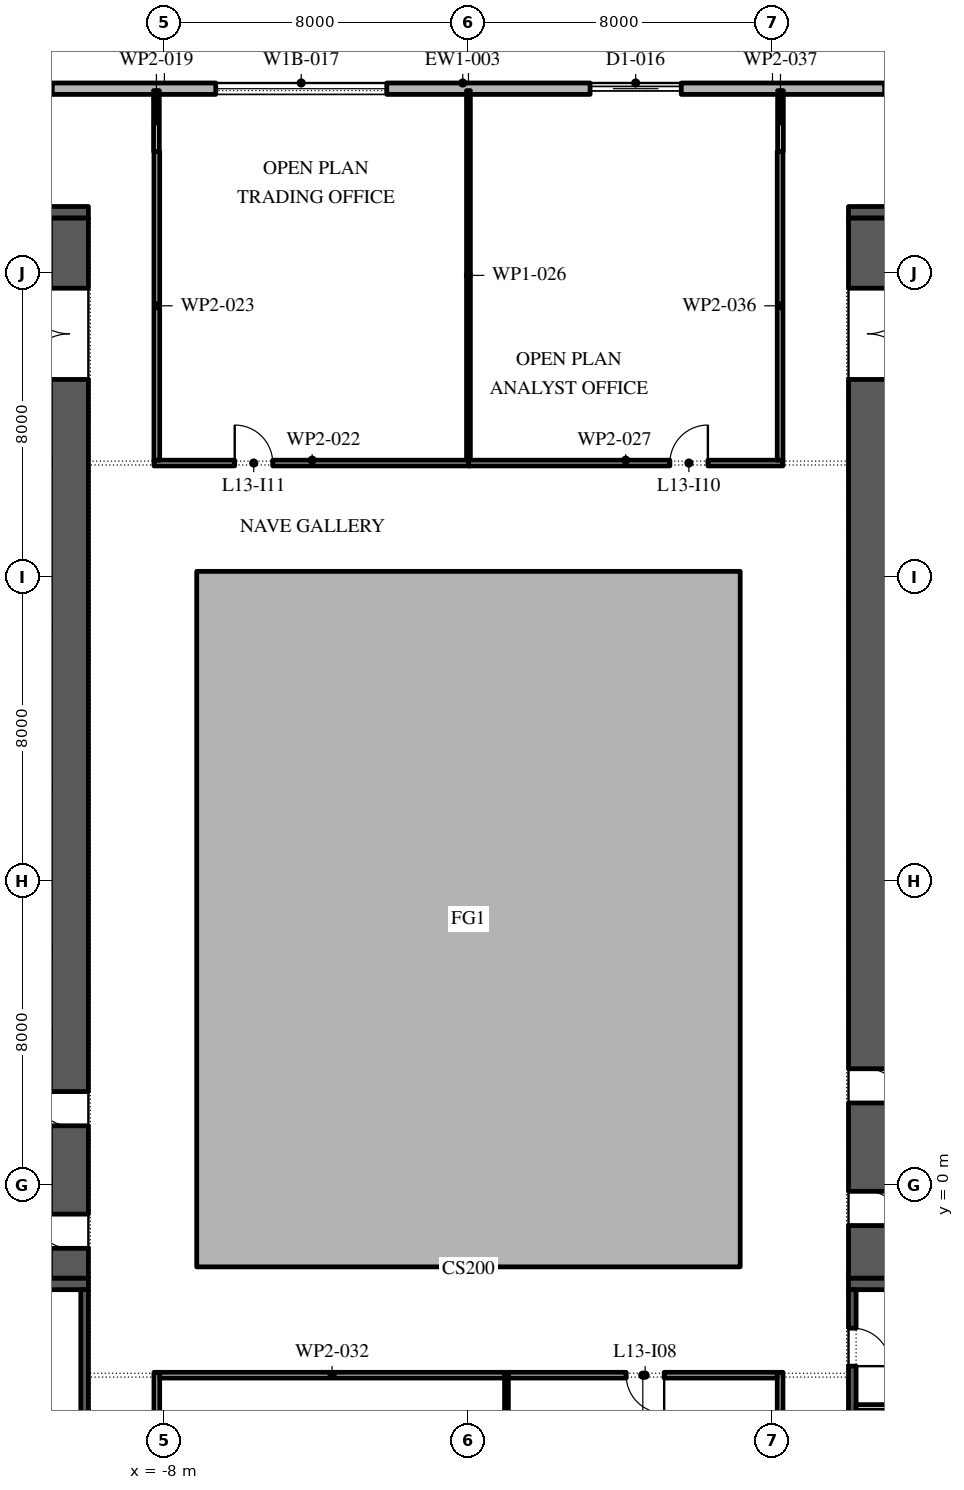
"""IFC4 building model, lengths in metres.
Left out: names, types, materials, properties, quantities, classifications, styles, units other than length and angle.
Written with IfcOpenShell. Run it as: python <this file> out.ifc"""

import sys

from ifc_helpers import new_model, si_unit, direction, frame, frame_2d, origin, place, context, subcontext, project, spatial, polyline, rectangle, outline, extrude, element, fill, save


model = new_model("IFC4")
c1 = context("Model", 3, precision=1e-05, world=origin(), true_north=direction((0.0, 1.0)))
c2 = subcontext(c1, "Body", "Model", "MODEL_VIEW")
j1 = project(units=[si_unit("LENGTHUNIT", "METRE"), si_unit("PLANEANGLEUNIT", "RADIAN")], contexts=[c1])
p1 = place(None, origin())
s1 = spatial("IfcSite", under=j1, at=p1, CompositionType="ELEMENT")
p2 = place(p1, origin())
s2 = spatial("IfcBuilding", under=s1, at=p2, CompositionType="ELEMENT")
p3 = place(p2, frame((0.0, 0.0, 64.8)))
s3 = spatial("IfcBuildingStorey", under=s2, at=p3, CompositionType="ELEMENT", Elevation=64.8)
p4 = place(p3, origin())
e1 = element("IfcWall", 1, at=p4, inside=s3, PredefinedType="STANDARD", context=c2, shape_type="SweptSolid", body=[
    extrude(outline(polyline([(-7.15, -2.15), (7.15, -2.15), (7.15, 16.15), (-7.15, 16.15), (-7.15, -2.15)]), holes=[polyline([(-7.0, -2.0), (-7.0, 16.0), (7.0, 16.0), (7.0, -2.0), (-7.0, -2.0)])]), origin(), (0.0, 0.0, 1.0), 4.0),
])
p5 = place(p3, frame((26.1, 28.85, 0.0), z_axis=(0.0, 0.0, 1.0), x_axis=(-1.0, 0.0, 0.0)))
e2 = element("IfcWall", 2, at=p5, inside=s3, PredefinedType="STANDARD", context=c2, shape_type="SweptSolid", body=[
    extrude(rectangle(XDim=52.5, YDim=0.3, at=frame_2d((26.25, 0.0))), origin(), (0.0, 0.0, 1.0), 4.0),
])
p6 = place(p5, frame((2.0, 0.0, 0.45)))
e3 = element("IfcOpeningElement", 3, at=p6, cuts=e2, PredefinedType="OPENING", context=c2, shape_type="SweptSolid", body=[
    extrude(rectangle(XDim=4.5, YDim=2.95, at=frame_2d((2.25, 1.475))), frame((0.0, 0.16, 0.0), z_axis=(0.0, -1.0, 0.0), x_axis=(1.0, 0.0, 0.0)), (0.0, 0.0, 1.0), 0.32),
])
p7 = place(p5, frame((10.65, 0.0, 0.45)))
e4 = element("IfcOpeningElement", 4, at=p7, cuts=e2, PredefinedType="OPENING", context=c2, shape_type="SweptSolid", body=[
    extrude(rectangle(XDim=4.5, YDim=2.95, at=frame_2d((2.25, 1.475))), frame((0.0, 0.16, 0.0), z_axis=(0.0, -1.0, 0.0), x_axis=(1.0, 0.0, 0.0)), (0.0, 0.0, 1.0), 0.32),
])
p8 = place(p5, frame((20.5, 0.0, 0.0)))
e5 = element("IfcOpeningElement", 5, at=p8, cuts=e2, PredefinedType="OPENING", context=c2, shape_type="SweptSolid", body=[
    extrude(rectangle(XDim=2.4, YDim=3.5, at=frame_2d((1.2, 1.75))), frame((0.0, 0.16, 0.0), z_axis=(0.0, -1.0, 0.0), x_axis=(1.0, 0.0, 0.0)), (0.0, 0.0, 1.0), 0.32),
])
p9 = place(p5, frame((28.25, 0.0, 0.45)))
e6 = element("IfcOpeningElement", 6, at=p9, cuts=e2, PredefinedType="OPENING", context=c2, shape_type="SweptSolid", body=[
    extrude(rectangle(XDim=4.5, YDim=2.95, at=frame_2d((2.25, 1.475))), frame((0.0, 0.16, 0.0), z_axis=(0.0, -1.0, 0.0), x_axis=(1.0, 0.0, 0.0)), (0.0, 0.0, 1.0), 0.32),
])
p10 = place(p5, frame((37.05, 0.0, 0.45)))
e7 = element("IfcOpeningElement", 7, at=p10, cuts=e2, PredefinedType="OPENING", context=c2, shape_type="SweptSolid", body=[
    extrude(rectangle(XDim=4.5, YDim=2.95, at=frame_2d((2.25, 1.475))), frame((0.0, 0.16, 0.0), z_axis=(0.0, -1.0, 0.0), x_axis=(1.0, 0.0, 0.0)), (0.0, 0.0, 1.0), 0.32),
])
p11 = place(p5, frame((45.85, 0.0, 0.45)))
e8 = element("IfcOpeningElement", 8, at=p11, cuts=e2, PredefinedType="OPENING", context=c2, shape_type="SweptSolid", body=[
    extrude(rectangle(XDim=4.5, YDim=2.95, at=frame_2d((2.25, 1.475))), frame((0.0, 0.16, 0.0), z_axis=(0.0, -1.0, 0.0), x_axis=(1.0, 0.0, 0.0)), (0.0, 0.0, 1.0), 0.32),
])
p12 = place(p3, frame((-10.5, -2.45, 0.0), z_axis=(0.0, 0.0, 1.0), x_axis=(0.0, 1.0, 0.0)))
e9 = element("IfcWall", 9, at=p12, inside=s3, PredefinedType="SHEAR", context=c2, shape_type="SweptSolid", body=[
    extrude(rectangle(XDim=27.9, YDim=1.0, at=frame_2d((13.95, 0.0))), origin(), (0.0, 0.0, 1.0), 4.0),
])
p13 = place(p12, frame((23.65, 0.0, 0.0)))
e10 = element("IfcOpeningElement", 10, at=p13, cuts=e9, PredefinedType="OPENING", context=c2, shape_type="SweptSolid", body=[
    extrude(rectangle(XDim=2.4, YDim=2.1, at=frame_2d((1.2, 1.05))), frame((0.0, 0.51, 0.0), z_axis=(0.0, -1.0, 0.0), x_axis=(1.0, 0.0, 0.0)), (0.0, 0.0, 1.0), 1.02),
])
p14 = place(p12, frame((0.788, 0.0, 0.0)))
e11 = element("IfcOpeningElement", 11, at=p14, cuts=e9, PredefinedType="OPENING", context=c2, shape_type="SweptSolid", body=[
    extrude(rectangle(XDim=0.9, YDim=2.1, at=frame_2d((0.45, 1.05))), frame((0.0, 0.51, 0.0), z_axis=(0.0, -1.0, 0.0), x_axis=(1.0, 0.0, 0.0)), (0.0, 0.0, 1.0), 1.02),
])
p15 = place(p12, frame((4.012, 0.0, 0.0)))
e12 = element("IfcOpeningElement", 12, at=p15, cuts=e9, PredefinedType="OPENING", context=c2, shape_type="SweptSolid", body=[
    extrude(rectangle(XDim=0.9, YDim=2.1, at=frame_2d((0.45, 1.05))), frame((0.0, 0.51, 0.0), z_axis=(0.0, -1.0, 0.0), x_axis=(1.0, 0.0, 0.0)), (0.0, 0.0, 1.0), 1.02),
])
for number, where, z_axis, x_axis in (
    (13, (-22.0, -2.6, 0.0), (0.0, 0.0, 1.0), (1.0, 0.0, 0.0)),
    (14, (-22.0, 25.6, 0.0), (0.0, 0.0, 1.0), (1.0, 0.0, 0.0)),
):
    element("IfcWall", number, at=place(p3, frame(where, z_axis=z_axis, x_axis=x_axis)), inside=s3, PredefinedType="SHEAR", context=c2, shape_type="SweptSolid", body=[
        extrude(rectangle(XDim=12.0, YDim=0.3, at=frame_2d((6.0, 0.0))), origin(), (0.0, 0.0, 1.0), 4.0),
    ])
p16 = place(p3, frame((-10.1, -15.8, 0.0), z_axis=(0.0, 0.0, 1.0), x_axis=(0.0, 1.0, 0.0)))
e15 = element("IfcWall", 15, at=p16, inside=s3, PredefinedType="SHEAR", context=c2, shape_type="SweptSolid", body=[
    extrude(rectangle(XDim=13.05, YDim=0.2, at=frame_2d((6.525, 0.0))), origin(), (0.0, 0.0, 1.0), 4.0),
])
p17 = place(p16, frame((6.075, 0.0, 0.0)))
e16 = element("IfcOpeningElement", 16, at=p17, cuts=e15, PredefinedType="OPENING", context=c2, shape_type="SweptSolid", body=[
    extrude(rectangle(XDim=0.9, YDim=2.1, at=frame_2d((0.45, 1.05))), frame((0.0, 0.11, 0.0), z_axis=(0.0, -1.0, 0.0), x_axis=(1.0, 0.0, 0.0)), (0.0, 0.0, 1.0), 0.22),
])
p18 = place(p3, frame((10.5, -2.45, 0.0), z_axis=(0.0, 0.0, 1.0), x_axis=(0.0, 1.0, 0.0)))
e17 = element("IfcWall", 17, at=p18, inside=s3, PredefinedType="SHEAR", context=c2, shape_type="SweptSolid", body=[
    extrude(rectangle(XDim=27.9, YDim=1.0, at=frame_2d((13.95, 0.0))), origin(), (0.0, 0.0, 1.0), 4.0),
])
p19 = place(p18, frame((23.65, 0.0, 0.0)))
e18 = element("IfcOpeningElement", 18, at=p19, cuts=e17, PredefinedType="OPENING", context=c2, shape_type="SweptSolid", body=[
    extrude(rectangle(XDim=2.4, YDim=2.1, at=frame_2d((1.2, 1.05))), frame((0.0, 0.51, 0.0), z_axis=(0.0, -1.0, 0.0), x_axis=(1.0, 0.0, 0.0)), (0.0, 0.0, 1.0), 1.02),
])
p20 = place(p18, frame((1.387, 0.0, 0.0)))
e19 = element("IfcOpeningElement", 19, at=p20, cuts=e17, PredefinedType="OPENING", context=c2, shape_type="SweptSolid", body=[
    extrude(rectangle(XDim=0.9, YDim=2.1, at=frame_2d((0.45, 1.05))), frame((0.0, 0.51, 0.0), z_axis=(0.0, -1.0, 0.0), x_axis=(1.0, 0.0, 0.0)), (0.0, 0.0, 1.0), 1.02),
])
p21 = place(p18, frame((4.613, 0.0, 0.0)))
e20 = element("IfcOpeningElement", 20, at=p21, cuts=e17, PredefinedType="OPENING", context=c2, shape_type="SweptSolid", body=[
    extrude(rectangle(XDim=0.9, YDim=2.1, at=frame_2d((0.45, 1.05))), frame((0.0, 0.51, 0.0), z_axis=(0.0, -1.0, 0.0), x_axis=(1.0, 0.0, 0.0)), (0.0, 0.0, 1.0), 1.02),
])
for number, where, z_axis, x_axis in (
    (21, (10.0, -2.6, 0.0), (0.0, 0.0, 1.0), (1.0, 0.0, 0.0)),
    (22, (10.0, 25.6, 0.0), (0.0, 0.0, 1.0), (1.0, 0.0, 0.0)),
):
    element("IfcWall", number, at=place(p3, frame(where, z_axis=z_axis, x_axis=x_axis)), inside=s3, PredefinedType="SHEAR", context=c2, shape_type="SweptSolid", body=[
        extrude(rectangle(XDim=12.0, YDim=0.3, at=frame_2d((6.0, 0.0))), origin(), (0.0, 0.0, 1.0), 4.0),
    ])
p22 = place(p3, frame((10.1, -15.8, 0.0), z_axis=(0.0, 0.0, 1.0), x_axis=(0.0, 1.0, 0.0)))
e23 = element("IfcWall", 23, at=p22, inside=s3, PredefinedType="SHEAR", context=c2, shape_type="SweptSolid", body=[
    extrude(rectangle(XDim=13.05, YDim=0.2, at=frame_2d((6.525, 0.0))), origin(), (0.0, 0.0, 1.0), 4.0),
])
p23 = place(p22, frame((4.488, 0.0, 0.0)))
e24 = element("IfcOpeningElement", 24, at=p23, cuts=e23, PredefinedType="OPENING", context=c2, shape_type="SweptSolid", body=[
    extrude(rectangle(XDim=0.9, YDim=2.1, at=frame_2d((0.45, 1.05))), frame((0.0, 0.11, 0.0), z_axis=(0.0, -1.0, 0.0), x_axis=(1.0, 0.0, 0.0)), (0.0, 0.0, 1.0), 0.22),
])
p24 = place(p22, frame((11.038, 0.0, 0.0)))
e25 = element("IfcOpeningElement", 25, at=p24, cuts=e23, PredefinedType="OPENING", context=c2, shape_type="SweptSolid", body=[
    extrude(rectangle(XDim=1.0, YDim=2.1, at=frame_2d((0.5, 1.05))), frame((0.0, 0.11, 0.0), z_axis=(0.0, -1.0, 0.0), x_axis=(1.0, 0.0, 0.0)), (0.0, 0.0, 1.0), 0.22),
])
p25 = place(p3, frame((10.2, -5.85, 0.0), z_axis=(0.0, 0.0, 1.0), x_axis=(1.0, 0.0, 0.0)))
e26 = element("IfcWall", 26, at=p25, inside=s3, PredefinedType="PARTITIONING", context=c2, shape_type="SweptSolid", body=[
    extrude(rectangle(XDim=11.6, YDim=0.15, at=frame_2d((5.8, 0.0))), origin(), (0.0, 0.0, 1.0), 4.0),
])
p26 = place(p3, frame((-8.21, 28.8, 0.0), z_axis=(0.0, 0.0, 1.0), x_axis=(0.0, -1.0, 0.0)))
e27 = element("IfcWall", 27, at=p26, inside=s3, PredefinedType="PARTITIONING", context=c2, shape_type="SweptSolid", body=[
    extrude(rectangle(XDim=1.6, YDim=0.15, at=frame_2d((0.8, 0.0))), origin(), (0.0, 0.0, 1.0), 4.0),
])
p27 = place(p3, frame((-8.2, -4.925, 0.0), z_axis=(0.0, 0.0, 1.0), x_axis=(0.0, -1.0, 0.0)))
e28 = element("IfcWall", 28, at=p27, inside=s3, PredefinedType="PARTITIONING", context=c2, shape_type="SweptSolid", body=[
    extrude(rectangle(XDim=12.8, YDim=0.15, at=frame_2d((6.4, 0.0))), origin(), (0.0, 0.0, 1.0), 4.0),
])
p28 = place(p27, frame((7.225, 0.0, 0.0)))
e29 = element("IfcOpeningElement", 29, at=p28, cuts=e28, PredefinedType="OPENING", context=c2, shape_type="SweptSolid", body=[
    extrude(rectangle(XDim=1.0, YDim=2.1, at=frame_2d((0.5, 1.05))), frame((0.0, 0.085, 0.0), z_axis=(0.0, -1.0, 0.0), x_axis=(1.0, 0.0, 0.0)), (0.0, 0.0, 1.0), 0.17),
])
p29 = place(p3, frame((-8.275, 19.0, 0.0), z_axis=(0.0, 0.0, 1.0), x_axis=(1.0, 0.0, 0.0)))
e30 = element("IfcWall", 30, at=p29, inside=s3, PredefinedType="PARTITIONING", context=c2, shape_type="SweptSolid", body=[
    extrude(rectangle(XDim=8.325, YDim=0.15, at=frame_2d((4.163, 0.0))), origin(), (0.0, 0.0, 1.0), 4.0),
])
p30 = place(p29, frame((2.125, 0.0, 0.0)))
e31 = element("IfcOpeningElement", 31, at=p30, cuts=e30, PredefinedType="OPENING", context=c2, shape_type="SweptSolid", body=[
    extrude(rectangle(XDim=1.0, YDim=2.1, at=frame_2d((0.5, 1.05))), frame((0.0, 0.085, 0.0), z_axis=(0.0, -1.0, 0.0), x_axis=(1.0, 0.0, 0.0)), (0.0, 0.0, 1.0), 0.17),
])
p31 = place(p3, frame((-8.2, 27.2, 0.0), z_axis=(0.0, 0.0, 1.0), x_axis=(0.0, -1.0, 0.0)))
e32 = element("IfcWall", 32, at=p31, inside=s3, PredefinedType="PARTITIONING", context=c2, shape_type="SweptSolid", body=[
    extrude(rectangle(XDim=8.125, YDim=0.15, at=frame_2d((4.062, 0.0))), origin(), (0.0, 0.0, 1.0), 4.0),
])
p32 = place(p3, frame((0.0, 19.075, 0.0), z_axis=(0.0, 0.0, 1.0), x_axis=(0.0, 1.0, 0.0)))
e33 = element("IfcWall", 33, at=p32, inside=s3, PredefinedType="PARTITIONING", context=c2, shape_type="SweptSolid", body=[
    extrude(rectangle(XDim=9.725, YDim=0.1, at=frame_2d((4.863, 0.0))), origin(), (0.0, 0.0, 1.0), 4.0),
])
p33 = place(p3, frame((0.0, 19.0, 0.0), z_axis=(0.0, 0.0, 1.0), x_axis=(1.0, 0.0, 0.0)))
e34 = element("IfcWall", 34, at=p33, inside=s3, PredefinedType="PARTITIONING", context=c2, shape_type="SweptSolid", body=[
    extrude(rectangle(XDim=8.275, YDim=0.15, at=frame_2d((4.137, 0.0))), origin(), (0.0, 0.0, 1.0), 4.0),
])
p34 = place(p33, frame((5.3, 0.0, 0.0)))
e35 = element("IfcOpeningElement", 35, at=p34, cuts=e34, PredefinedType="OPENING", context=c2, shape_type="SweptSolid", body=[
    extrude(rectangle(XDim=1.0, YDim=2.1, at=frame_2d((0.5, 1.05))), frame((0.0, 0.085, 0.0), z_axis=(0.0, -1.0, 0.0), x_axis=(1.0, 0.0, 0.0)), (0.0, 0.0, 1.0), 0.17),
])
p35 = place(p3, frame((1.0, -11.45, 0.0), z_axis=(0.0, 0.0, 1.0), x_axis=(0.0, 1.0, 0.0)))
e36 = element("IfcWall", 36, at=p35, inside=s3, PredefinedType="PARTITIONING", context=c2, shape_type="SweptSolid", body=[
    extrude(rectangle(XDim=6.525, YDim=0.1, at=frame_2d((3.262, 0.0))), origin(), (0.0, 0.0, 1.0), 4.0),
])
p36 = place(p3, frame((0.95, -5.0, 0.0), z_axis=(0.0, 0.0, 1.0), x_axis=(-1.0, 0.0, 0.0)))
e37 = element("IfcWall", 37, at=p36, inside=s3, PredefinedType="PARTITIONING", context=c2, shape_type="SweptSolid", body=[
    extrude(rectangle(XDim=9.075, YDim=0.15, at=frame_2d((4.538, 0.0))), origin(), (0.0, 0.0, 1.0), 4.0),
])
p37 = place(p3, frame((8.2, -11.45, 0.0), z_axis=(0.0, 0.0, 1.0), x_axis=(0.0, 1.0, 0.0)))
e38 = element("IfcWall", 38, at=p37, inside=s3, PredefinedType="PARTITIONING", context=c2, shape_type="SweptSolid", body=[
    extrude(rectangle(XDim=6.525, YDim=0.15, at=frame_2d((3.262, 0.0))), origin(), (0.0, 0.0, 1.0), 4.0),
])
p38 = place(p3, frame((8.125, -5.0, 0.0), z_axis=(0.0, 0.0, 1.0), x_axis=(-1.0, 0.0, 0.0)))
e39 = element("IfcWall", 39, at=p38, inside=s3, PredefinedType="PARTITIONING", context=c2, shape_type="SweptSolid", body=[
    extrude(rectangle(XDim=7.075, YDim=0.15, at=frame_2d((3.538, 0.0))), origin(), (0.0, 0.0, 1.0), 4.0),
])
p39 = place(p38, frame((2.975, 0.0, 0.0)))
e40 = element("IfcOpeningElement", 40, at=p39, cuts=e39, PredefinedType="OPENING", context=c2, shape_type="SweptSolid", body=[
    extrude(rectangle(XDim=1.0, YDim=2.1, at=frame_2d((0.5, 1.05))), frame((0.0, 0.085, 0.0), z_axis=(0.0, -1.0, 0.0), x_axis=(1.0, 0.0, 0.0)), (0.0, 0.0, 1.0), 0.17),
])
p40 = place(p3, frame((8.2, 19.075, 0.0), z_axis=(0.0, 0.0, 1.0), x_axis=(0.0, 1.0, 0.0)))
e41 = element("IfcWall", 41, at=p40, inside=s3, PredefinedType="PARTITIONING", context=c2, shape_type="SweptSolid", body=[
    extrude(rectangle(XDim=8.125, YDim=0.15, at=frame_2d((4.062, 0.0))), origin(), (0.0, 0.0, 1.0), 4.0),
])
p41 = place(p3, frame((8.21, 27.2, 0.0), z_axis=(0.0, 0.0, 1.0), x_axis=(0.0, 1.0, 0.0)))
e42 = element("IfcWall", 42, at=p41, inside=s3, PredefinedType="PARTITIONING", context=c2, shape_type="SweptSolid", body=[
    extrude(rectangle(XDim=1.6, YDim=0.15, at=frame_2d((0.8, 0.0))), origin(), (0.0, 0.0, 1.0), 4.0),
])
p42 = place(p8, origin())
e43 = element("IfcDoor", 43, at=p42, inside=s3, OperationType="DOUBLE_DOOR_SLIDING", PredefinedType="DOOR", context=c2, shape_type="SweptSolid", body=[
    extrude(rectangle(XDim=2.4, YDim=3.5, at=frame_2d((1.2, 1.75))), frame((0.0, 0.025, 0.0), z_axis=(0.0, -1.0, 0.0), x_axis=(1.0, 0.0, 0.0)), (0.0, 0.0, 1.0), 0.05),
])
fill(e5, e43)
p43 = place(p9, origin())
e44 = element("IfcWindow", 44, at=p43, inside=s3, PartitioningType="DOUBLE_PANEL_VERTICAL", PredefinedType="WINDOW", context=c2, shape_type="SweptSolid", body=[
    extrude(rectangle(XDim=4.5, YDim=2.95, at=frame_2d((2.25, 1.475))), frame((0.0, 0.03, 0.0), z_axis=(0.0, -1.0, 0.0), x_axis=(1.0, 0.0, 0.0)), (0.0, 0.0, 1.0), 0.06),
])
fill(e6, e44)
p44 = place(p13, origin())
e45 = element("IfcDoor", 45, at=p44, inside=s3, OperationType="DOUBLE_DOOR_SINGLE_SWING", PredefinedType="DOOR", context=c2, shape_type="SweptSolid", body=[
    extrude(rectangle(XDim=2.4, YDim=2.1, at=frame_2d((1.2, 1.05))), frame((0.0, 0.025, 0.0), z_axis=(0.0, -1.0, 0.0), x_axis=(1.0, 0.0, 0.0)), (0.0, 0.0, 1.0), 0.05),
])
fill(e10, e45)
p45 = place(p19, frame((2.4, 0.0, 0.0), z_axis=(0.0, 0.0, 1.0), x_axis=(-1.0, 0.0, 0.0)))
e46 = element("IfcDoor", 46, at=p45, inside=s3, OperationType="DOUBLE_DOOR_SINGLE_SWING", PredefinedType="DOOR", context=c2, shape_type="SweptSolid", body=[
    extrude(rectangle(XDim=2.4, YDim=2.1, at=frame_2d((1.2, 1.05))), frame((0.0, 0.025, 0.0), z_axis=(0.0, -1.0, 0.0), x_axis=(1.0, 0.0, 0.0)), (0.0, 0.0, 1.0), 0.05),
])
fill(e18, e46)
p46 = place(p24, frame((1.0, -0.15, 0.0), z_axis=(0.0, 0.0, 1.0), x_axis=(-1.0, 0.0, 0.0)))
e47 = element("IfcDoor", 47, at=p46, inside=s3, OperationType="SINGLE_SWING_LEFT", PredefinedType="DOOR", context=c2, shape_type="SweptSolid", body=[
    extrude(rectangle(XDim=1.0, YDim=2.1, at=frame_2d((0.5, 1.05))), frame((0.0, -0.05, 0.0), z_axis=(0.0, -1.0, 0.0), x_axis=(1.0, 0.0, 0.0)), (0.0, 0.0, 1.0), 0.05),
])
fill(e25, e47)
p47 = place(p39, origin())
e48 = element("IfcDoor", 48, at=p47, inside=s3, OperationType="SINGLE_SWING_RIGHT", PredefinedType="DOOR", context=c2, shape_type="SweptSolid", body=[
    extrude(rectangle(XDim=1.0, YDim=2.1, at=frame_2d((0.5, 1.05))), frame((0.0, 0.025, 0.0), z_axis=(0.0, -1.0, 0.0), x_axis=(1.0, 0.0, 0.0)), (0.0, 0.0, 1.0), 0.05),
])
fill(e40, e48)
p48 = place(p34, origin())
e49 = element("IfcDoor", 49, at=p48, inside=s3, OperationType="SINGLE_SWING_LEFT", PredefinedType="DOOR", context=c2, shape_type="SweptSolid", body=[
    extrude(rectangle(XDim=1.0, YDim=2.1, at=frame_2d((0.5, 1.05))), frame((0.0, 0.025, 0.0), z_axis=(0.0, -1.0, 0.0), x_axis=(1.0, 0.0, 0.0)), (0.0, 0.0, 1.0), 0.05),
])
fill(e35, e49)
p49 = place(p30, origin())
e50 = element("IfcDoor", 50, at=p49, inside=s3, OperationType="SINGLE_SWING_RIGHT", PredefinedType="DOOR", context=c2, shape_type="SweptSolid", body=[
    extrude(rectangle(XDim=1.0, YDim=2.1, at=frame_2d((0.5, 1.05))), frame((0.0, 0.025, 0.0), z_axis=(0.0, -1.0, 0.0), x_axis=(1.0, 0.0, 0.0)), (0.0, 0.0, 1.0), 0.05),
])
fill(e31, e50)
save(model, sys.argv[1])
